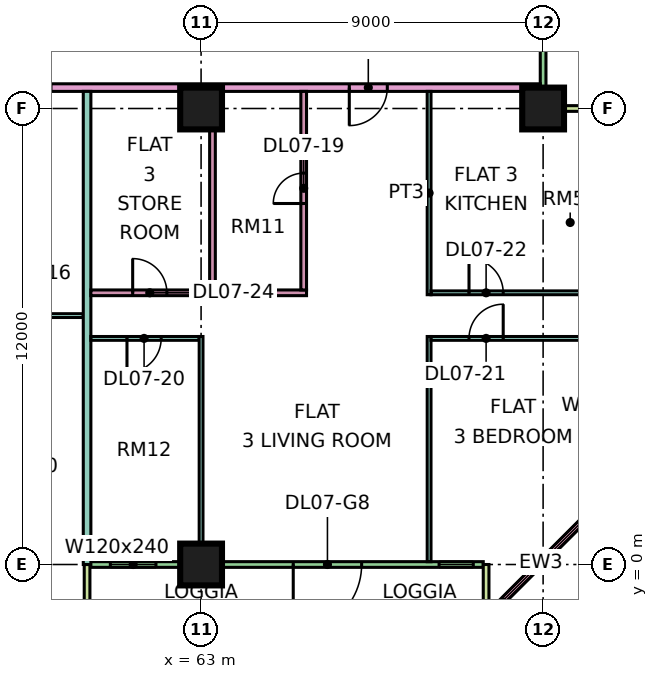
"""IFC4 building model, lengths in metres.
Left out: names, types, materials, properties, quantities, classifications, styles, units other than length and angle.
Written with IfcOpenShell. Run it as: python <this file> out.ifc"""

import sys

from ifc_helpers import new_model, si_unit, direction, frame, frame_2d, origin, origin_2d, place, context, subcontext, project, spatial, rectangle, extrude, element, fill, save


model = new_model("IFC4")
c1 = context("Model", 3, precision=1e-05, world=origin(), true_north=direction((0.0, 1.0)))
c2 = subcontext(c1, "Body", "Model", "MODEL_VIEW")
j1 = project(units=[si_unit("LENGTHUNIT", "METRE"), si_unit("PLANEANGLEUNIT", "RADIAN")], contexts=[c1])
p1 = place(None, origin())
s1 = spatial("IfcSite", under=j1, at=p1, CompositionType="ELEMENT")
p2 = place(p1, origin())
s2 = spatial("IfcBuilding", under=s1, at=p2, CompositionType="ELEMENT")
p3 = place(p2, frame((0.0, 0.0, 41.4)))
s3 = spatial("IfcBuildingStorey", under=s2, at=p3, CompositionType="ELEMENT", Elevation=41.4)
for number, where, z_axis, x_axis in (
    (1, (63.0, 0.0, 0.0), (0.0, 0.0, 1.0), (1.0, 0.0, 0.0)),
    (2, (63.0, 12.0, 0.0), (0.0, 0.0, 1.0), (1.0, 0.0, 0.0)),
    (3, (72.0, 12.0, 0.0), (0.0, 0.0, 1.0), (1.0, 0.0, 0.0)),
):
    element("IfcColumn", number, at=place(p3, frame(where, z_axis=z_axis, x_axis=x_axis)), inside=s3, PredefinedType="COLUMN", context=c2, shape_type="SweptSolid", body=[
        extrude(rectangle(XDim=1.1, YDim=1.1, at=origin_2d()), origin(), (0.0, 0.0, 1.0), 3.75),
    ])
p4 = place(p3, frame((60.075, 0.0, 0.0), z_axis=(0.0, 0.0, 1.0), x_axis=(1.0, 0.0, 0.0)))
e4 = element("IfcWall", 4, at=p4, inside=s3, PredefinedType="SOLIDWALL", context=c2, shape_type="SweptSolid", body=[
    extrude(rectangle(XDim=10.35, YDim=0.15, at=frame_2d((5.175, 0.0))), origin(), (0.0, 0.0, 1.0), 3.35),
])
p5 = place(p4, frame((0.538, 0.0, 0.45)))
e5 = element("IfcOpeningElement", 5, at=p5, cuts=e4, PredefinedType="OPENING", context=c2, shape_type="SweptSolid", body=[
    extrude(rectangle(XDim=1.2, YDim=2.4, at=frame_2d((0.6, 1.2))), frame((0.0, 0.085, 0.0), z_axis=(0.0, -1.0, 0.0), x_axis=(1.0, 0.0, 0.0)), (0.0, 0.0, 1.0), 0.17),
])
p6 = place(p4, frame((5.35, 0.0, 0.0)))
e6 = element("IfcOpeningElement", 6, at=p6, cuts=e4, PredefinedType="OPENING", context=c2, shape_type="SweptSolid", body=[
    extrude(rectangle(XDim=1.8, YDim=2.4, at=frame_2d((0.9, 1.2))), frame((0.0, 0.085, 0.0), z_axis=(0.0, -1.0, 0.0), x_axis=(1.0, 0.0, 0.0)), (0.0, 0.0, 1.0), 0.17),
])
p7 = place(p4, frame((9.188, 0.0, 0.45)))
e7 = element("IfcOpeningElement", 7, at=p7, cuts=e4, PredefinedType="OPENING", context=c2, shape_type="SweptSolid", body=[
    extrude(rectangle(XDim=0.9, YDim=2.4, at=frame_2d((0.45, 1.2))), frame((0.0, 0.085, 0.0), z_axis=(0.0, -1.0, 0.0), x_axis=(1.0, 0.0, 0.0)), (0.0, 0.0, 1.0), 0.17),
])
for number, where, z_axis, x_axis in (
    (8, (60.0, -1.5, 0.0), (0.0, 0.0, 1.0), (0.0, 1.0, 0.0)),
    (9, (70.5, -1.5, 0.0), (0.0, 0.0, 1.0), (0.0, 1.0, 0.0)),
):
    element("IfcWall", number, at=place(p3, frame(where, z_axis=z_axis, x_axis=x_axis)), inside=s3, PredefinedType="SOLIDWALL", context=c2, shape_type="SweptSolid", body=[
        extrude(rectangle(XDim=1.5, YDim=0.15, at=frame_2d((0.75, 0.0))), origin(), (0.0, 0.0, 1.0), 3.35),
    ])
p8 = place(p3, frame((70.447, -1.447, 0.0), z_axis=(0.0, 0.0, 1.0), x_axis=(0.707106781187, 0.707106781187, 0.0)))
e10 = element("IfcWall", 10, at=p8, inside=s3, PredefinedType="SOLIDWALL", context=c2, shape_type="SweptSolid", body=[
    extrude(rectangle(XDim=4.243, YDim=0.15, at=frame_2d((2.121, 0.0))), origin(), (0.0, 0.0, 1.0), 3.35),
])
p9 = place(p8, frame((0.744, 0.0, 0.45)))
e11 = element("IfcOpeningElement", 11, at=p9, cuts=e10, PredefinedType="OPENING", context=c2, shape_type="SweptSolid", body=[
    extrude(rectangle(XDim=3.0, YDim=2.4, at=frame_2d((1.5, 1.2))), frame((0.0, 0.085, 0.0), z_axis=(0.0, -1.0, 0.0), x_axis=(1.0, 0.0, 0.0)), (0.0, 0.0, 1.0), 0.17),
])
p10 = place(p3, frame((72.0, 12.075, 0.0), z_axis=(0.0, 0.0, 1.0), x_axis=(0.0, 1.0, 0.0)))
e12 = element("IfcWall", 12, at=p10, inside=s3, PredefinedType="SOLIDWALL", context=c2, shape_type="SweptSolid", body=[
    extrude(rectangle(XDim=10.35, YDim=0.15, at=frame_2d((5.175, 0.0))), origin(), (0.0, 0.0, 1.0), 3.35),
])
p11 = place(p10, frame((4.575, 0.0, 1.7)))
e13 = element("IfcOpeningElement", 13, at=p11, cuts=e12, PredefinedType="OPENING", context=c2, shape_type="SweptSolid", body=[
    extrude(rectangle(XDim=1.2, YDim=0.9, at=frame_2d((0.6, 0.45))), frame((0.0, 0.085, 0.0), z_axis=(0.0, -1.0, 0.0), x_axis=(1.0, 0.0, 0.0)), (0.0, 0.0, 1.0), 0.17),
])
p12 = place(p10, frame((8.587, 0.0, 0.45)))
e14 = element("IfcOpeningElement", 14, at=p12, cuts=e12, PredefinedType="OPENING", context=c2, shape_type="SweptSolid", body=[
    extrude(rectangle(XDim=1.2, YDim=2.4, at=frame_2d((0.6, 1.2))), frame((0.0, 0.085, 0.0), z_axis=(0.0, -1.0, 0.0), x_axis=(1.0, 0.0, 0.0)), (0.0, 0.0, 1.0), 0.17),
])
p13 = place(p3, frame((73.5, 12.0, 0.0), z_axis=(0.0, 0.0, 1.0), x_axis=(-1.0, 0.0, 0.0)))
e15 = element("IfcWall", 15, at=p13, inside=s3, PredefinedType="SOLIDWALL", context=c2, shape_type="SweptSolid", body=[
    extrude(rectangle(XDim=1.5, YDim=0.15, at=frame_2d((0.75, 0.0))), origin(), (0.0, 0.0, 1.0), 3.35),
])
p14 = place(p3, frame((40.65, 12.55, 0.0), z_axis=(0.0, 0.0, 1.0), x_axis=(1.0, 0.0, 0.0)))
e16 = element("IfcWall", 16, at=p14, inside=s3, PredefinedType="PARTITIONING", context=c2, shape_type="SweptSolid", body=[
    extrude(rectangle(XDim=31.276, YDim=0.2, at=frame_2d((15.638, 0.0))), origin(), (0.0, 0.0, 1.0), 3.35),
])
p15 = place(p14, frame((17.4, 0.0, 0.0)))
e17 = element("IfcOpeningElement", 17, at=p15, cuts=e16, PredefinedType="OPENING", context=c2, shape_type="SweptSolid", body=[
    extrude(rectangle(XDim=1.0, YDim=2.1, at=frame_2d((0.5, 1.05))), frame((0.0, 0.11, 0.0), z_axis=(0.0, -1.0, 0.0), x_axis=(1.0, 0.0, 0.0)), (0.0, 0.0, 1.0), 0.22),
])
p16 = place(p14, frame((26.25, 0.0, 0.0)))
e18 = element("IfcOpeningElement", 18, at=p16, cuts=e16, PredefinedType="OPENING", context=c2, shape_type="SweptSolid", body=[
    extrude(rectangle(XDim=1.0, YDim=2.1, at=frame_2d((0.5, 1.05))), frame((0.0, 0.11, 0.0), z_axis=(0.0, -1.0, 0.0), x_axis=(1.0, 0.0, 0.0)), (0.0, 0.0, 1.0), 0.22),
])
p17 = place(p14, frame((1.05, 0.0, 0.0)))
e19 = element("IfcOpeningElement", 19, at=p17, cuts=e16, PredefinedType="OPENING", context=c2, shape_type="SweptSolid", body=[
    extrude(rectangle(XDim=1.0, YDim=2.1, at=frame_2d((0.5, 1.05))), frame((0.0, 0.11, 0.0), z_axis=(0.0, -1.0, 0.0), x_axis=(1.0, 0.0, 0.0)), (0.0, 0.0, 1.0), 0.22),
])
p18 = place(p3, frame((54.05, 6.55, 0.0), z_axis=(0.0, 0.0, 1.0), x_axis=(1.0, 0.0, 0.0)))
e20 = element("IfcWall", 20, at=p18, inside=s3, PredefinedType="PARTITIONING", context=c2, shape_type="SweptSolid", body=[
    extrude(rectangle(XDim=5.85, YDim=0.1, at=frame_2d((2.925, 0.0))), origin(), (0.0, 0.0, 1.0), 3.35),
])
p19 = place(p18, frame((1.0, 0.0, 0.0)))
e21 = element("IfcOpeningElement", 21, at=p19, cuts=e20, PredefinedType="OPENING", context=c2, shape_type="SweptSolid", body=[
    extrude(rectangle(XDim=0.9, YDim=2.1, at=frame_2d((0.45, 1.05))), frame((0.0, 0.06, 0.0), z_axis=(0.0, -1.0, 0.0), x_axis=(1.0, 0.0, 0.0)), (0.0, 0.0, 1.0), 0.12),
])
p20 = place(p18, frame((4.0, 0.0, 0.0)))
e22 = element("IfcOpeningElement", 22, at=p20, cuts=e20, PredefinedType="OPENING", context=c2, shape_type="SweptSolid", body=[
    extrude(rectangle(XDim=0.9, YDim=2.1, at=frame_2d((0.45, 1.05))), frame((0.0, 0.06, 0.0), z_axis=(0.0, -1.0, 0.0), x_axis=(1.0, 0.0, 0.0)), (0.0, 0.0, 1.0), 0.12),
])
p21 = place(p3, frame((60.0, 0.0, 0.0), z_axis=(0.0, 0.0, 1.0), x_axis=(0.0, 1.0, 0.0)))
e23 = element("IfcWall", 23, at=p21, inside=s3, PredefinedType="PARTITIONING", context=c2, shape_type="SweptSolid", body=[
    extrude(rectangle(XDim=12.45, YDim=0.2, at=frame_2d((6.225, 0.0))), origin(), (0.0, 0.0, 1.0), 3.35),
])
p22 = place(p3, frame((60.1, 5.95, 0.0), z_axis=(0.0, 0.0, 1.0), x_axis=(1.0, 0.0, 0.0)))
e24 = element("IfcWall", 24, at=p22, inside=s3, PredefinedType="PARTITIONING", context=c2, shape_type="SweptSolid", body=[
    extrude(rectangle(XDim=2.85, YDim=0.1, at=frame_2d((1.425, 0.0))), origin(), (0.0, 0.0, 1.0), 3.35),
])
p23 = place(p22, frame((0.95, 0.0, 0.0)))
e25 = element("IfcOpeningElement", 25, at=p23, cuts=e24, PredefinedType="OPENING", context=c2, shape_type="SweptSolid", body=[
    extrude(rectangle(XDim=0.9, YDim=2.1, at=frame_2d((0.45, 1.05))), frame((0.0, 0.06, 0.0), z_axis=(0.0, -1.0, 0.0), x_axis=(1.0, 0.0, 0.0)), (0.0, 0.0, 1.0), 0.12),
])
p24 = place(p3, frame((60.1, 7.15, 0.0), z_axis=(0.0, 0.0, 1.0), x_axis=(1.0, 0.0, 0.0)))
e26 = element("IfcWall", 26, at=p24, inside=s3, PredefinedType="PARTITIONING", context=c2, shape_type="SweptSolid", body=[
    extrude(rectangle(XDim=5.675, YDim=0.15, at=frame_2d((2.837, 0.0))), origin(), (0.0, 0.0, 1.0), 3.35),
])
p25 = place(p24, frame((1.1, 0.0, 0.0)))
e27 = element("IfcOpeningElement", 27, at=p25, cuts=e26, PredefinedType="OPENING", context=c2, shape_type="SweptSolid", body=[
    extrude(rectangle(XDim=0.9, YDim=2.1, at=frame_2d((0.45, 1.05))), frame((0.0, 0.085, 0.0), z_axis=(0.0, -1.0, 0.0), x_axis=(1.0, 0.0, 0.0)), (0.0, 0.0, 1.0), 0.17),
])
p26 = place(p3, frame((63.0, 0.074, 0.0), z_axis=(0.0, 0.0, 1.0), x_axis=(0.0, 1.0, 0.0)))
e28 = element("IfcWall", 28, at=p26, inside=s3, PredefinedType="PARTITIONING", context=c2, shape_type="SweptSolid", body=[
    extrude(rectangle(XDim=5.926, YDim=0.1, at=frame_2d((2.963, 0.0))), origin(), (0.0, 0.0, 1.0), 3.35),
])
p27 = place(p3, frame((63.3, 7.225, 0.0), z_axis=(0.0, 0.0, 1.0), x_axis=(0.0, 1.0, 0.0)))
e29 = element("IfcWall", 29, at=p27, inside=s3, PredefinedType="PARTITIONING", context=c2, shape_type="SweptSolid", body=[
    extrude(rectangle(XDim=5.225, YDim=0.15, at=frame_2d((2.612, 0.0))), origin(), (0.0, 0.0, 1.0), 3.35),
])
p28 = place(p3, frame((65.7, 7.225, 0.0), z_axis=(0.0, 0.0, 1.0), x_axis=(0.0, 1.0, 0.0)))
e30 = element("IfcWall", 30, at=p28, inside=s3, PredefinedType="PARTITIONING", context=c2, shape_type="SweptSolid", body=[
    extrude(rectangle(XDim=5.225, YDim=0.15, at=frame_2d((2.612, 0.0))), origin(), (0.0, 0.0, 1.0), 3.35),
])
p29 = place(p28, frame((2.275, 0.0, 0.0)))
e31 = element("IfcOpeningElement", 31, at=p29, cuts=e30, PredefinedType="OPENING", context=c2, shape_type="SweptSolid", body=[
    extrude(rectangle(XDim=0.8, YDim=2.1, at=frame_2d((0.4, 1.05))), frame((0.0, 0.085, 0.0), z_axis=(0.0, -1.0, 0.0), x_axis=(1.0, 0.0, 0.0)), (0.0, 0.0, 1.0), 0.17),
])
p30 = place(p3, frame((69.0, 0.074, 0.0), z_axis=(0.0, 0.0, 1.0), x_axis=(0.0, 1.0, 0.0)))
e32 = element("IfcWall", 32, at=p30, inside=s3, PredefinedType="PARTITIONING", context=c2, shape_type="SweptSolid", body=[
    extrude(rectangle(XDim=5.926, YDim=0.1, at=frame_2d((2.963, 0.0))), origin(), (0.0, 0.0, 1.0), 3.35),
])
p31 = place(p3, frame((69.0, 7.1, 0.0), z_axis=(0.0, 0.0, 1.0), x_axis=(0.0, 1.0, 0.0)))
e33 = element("IfcWall", 33, at=p31, inside=s3, PredefinedType="PARTITIONING", context=c2, shape_type="SweptSolid", body=[
    extrude(rectangle(XDim=5.35, YDim=0.1, at=frame_2d((2.675, 0.0))), origin(), (0.0, 0.0, 1.0), 3.35),
])
p32 = place(p3, frame((69.05, 5.95, 0.0), z_axis=(0.0, 0.0, 1.0), x_axis=(1.0, 0.0, 0.0)))
e34 = element("IfcWall", 34, at=p32, inside=s3, PredefinedType="PARTITIONING", context=c2, shape_type="SweptSolid", body=[
    extrude(rectangle(XDim=4.3, YDim=0.1, at=frame_2d((2.15, 0.0))), origin(), (0.0, 0.0, 1.0), 3.35),
])
p33 = place(p32, frame((1.0, 0.0, 0.0)))
e35 = element("IfcOpeningElement", 35, at=p33, cuts=e34, PredefinedType="OPENING", context=c2, shape_type="SweptSolid", body=[
    extrude(rectangle(XDim=0.9, YDim=2.1, at=frame_2d((0.45, 1.05))), frame((0.0, 0.06, 0.0), z_axis=(0.0, -1.0, 0.0), x_axis=(1.0, 0.0, 0.0)), (0.0, 0.0, 1.0), 0.12),
])
p34 = place(p3, frame((69.05, 7.15, 0.0), z_axis=(0.0, 0.0, 1.0), x_axis=(1.0, 0.0, 0.0)))
e36 = element("IfcWall", 36, at=p34, inside=s3, PredefinedType="PARTITIONING", context=c2, shape_type="SweptSolid", body=[
    extrude(rectangle(XDim=4.3, YDim=0.1, at=frame_2d((2.15, 0.0))), origin(), (0.0, 0.0, 1.0), 3.35),
])
p35 = place(p34, frame((1.0, 0.0, 0.0)))
e37 = element("IfcOpeningElement", 37, at=p35, cuts=e36, PredefinedType="OPENING", context=c2, shape_type="SweptSolid", body=[
    extrude(rectangle(XDim=0.9, YDim=2.1, at=frame_2d((0.45, 1.05))), frame((0.0, 0.06, 0.0), z_axis=(0.0, -1.0, 0.0), x_axis=(1.0, 0.0, 0.0)), (0.0, 0.0, 1.0), 0.12),
])
p36 = place(p5, origin())
e38 = element("IfcWindow", 38, at=p36, inside=s3, PartitioningType="SINGLE_PANEL", PredefinedType="WINDOW", context=c2, shape_type="SweptSolid", body=[
    extrude(rectangle(XDim=1.2, YDim=2.4, at=frame_2d((0.6, 1.2))), frame((0.0, 0.03, 0.0), z_axis=(0.0, -1.0, 0.0), x_axis=(1.0, 0.0, 0.0)), (0.0, 0.0, 1.0), 0.06),
])
fill(e5, e38)
p37 = place(p6, frame((1.8, 0.0, 0.0), z_axis=(0.0, 0.0, 1.0), x_axis=(-1.0, 0.0, 0.0)))
e39 = element("IfcDoor", 39, at=p37, inside=s3, OperationType="DOUBLE_DOOR_SINGLE_SWING", PredefinedType="DOOR", context=c2, shape_type="SweptSolid", body=[
    extrude(rectangle(XDim=1.8, YDim=2.4, at=frame_2d((0.9, 1.2))), frame((0.0, 0.025, 0.0), z_axis=(0.0, -1.0, 0.0), x_axis=(1.0, 0.0, 0.0)), (0.0, 0.0, 1.0), 0.05),
])
fill(e6, e39)
p38 = place(p7, origin())
e40 = element("IfcWindow", 40, at=p38, inside=s3, PartitioningType="SINGLE_PANEL", PredefinedType="WINDOW", context=c2, shape_type="SweptSolid", body=[
    extrude(rectangle(XDim=0.9, YDim=2.4, at=frame_2d((0.45, 1.2))), frame((0.0, 0.03, 0.0), z_axis=(0.0, -1.0, 0.0), x_axis=(1.0, 0.0, 0.0)), (0.0, 0.0, 1.0), 0.06),
])
fill(e7, e40)
p39 = place(p9, origin())
e41 = element("IfcWindow", 41, at=p39, inside=s3, PartitioningType="SINGLE_PANEL", PredefinedType="WINDOW", context=c2, shape_type="SweptSolid", body=[
    extrude(rectangle(XDim=3.0, YDim=2.4, at=frame_2d((1.5, 1.2))), frame((0.0, 0.03, 0.0), z_axis=(0.0, -1.0, 0.0), x_axis=(1.0, 0.0, 0.0)), (0.0, 0.0, 1.0), 0.06),
])
fill(e11, e41)
p40 = place(p29, origin())
e42 = element("IfcDoor", 42, at=p40, inside=s3, OperationType="SINGLE_SWING_LEFT", PredefinedType="DOOR", context=c2, shape_type="SweptSolid", body=[
    extrude(rectangle(XDim=0.8, YDim=2.1, at=frame_2d((0.4, 1.05))), frame((0.0, 0.025, 0.0), z_axis=(0.0, -1.0, 0.0), x_axis=(1.0, 0.0, 0.0)), (0.0, 0.0, 1.0), 0.05),
])
fill(e31, e42)
p41 = place(p23, frame((0.9, 0.0, 0.0), z_axis=(0.0, 0.0, 1.0), x_axis=(-1.0, 0.0, 0.0)))
e43 = element("IfcDoor", 43, at=p41, inside=s3, OperationType="SINGLE_SWING_LEFT", PredefinedType="DOOR", context=c2, shape_type="SweptSolid", body=[
    extrude(rectangle(XDim=0.9, YDim=2.1, at=frame_2d((0.45, 1.05))), frame((0.0, 0.025, 0.0), z_axis=(0.0, -1.0, 0.0), x_axis=(1.0, 0.0, 0.0)), (0.0, 0.0, 1.0), 0.05),
])
fill(e25, e43)
p42 = place(p33, frame((0.9, 0.0, 0.0), z_axis=(0.0, 0.0, 1.0), x_axis=(-1.0, 0.0, 0.0)))
e44 = element("IfcDoor", 44, at=p42, inside=s3, OperationType="SINGLE_SWING_RIGHT", PredefinedType="DOOR", context=c2, shape_type="SweptSolid", body=[
    extrude(rectangle(XDim=0.9, YDim=2.1, at=frame_2d((0.45, 1.05))), frame((0.0, 0.025, 0.0), z_axis=(0.0, -1.0, 0.0), x_axis=(1.0, 0.0, 0.0)), (0.0, 0.0, 1.0), 0.05),
])
fill(e35, e44)
p43 = place(p35, origin())
e45 = element("IfcDoor", 45, at=p43, inside=s3, OperationType="SINGLE_SWING_LEFT", PredefinedType="DOOR", context=c2, shape_type="SweptSolid", body=[
    extrude(rectangle(XDim=0.9, YDim=2.1, at=frame_2d((0.45, 1.05))), frame((0.0, 0.025, 0.0), z_axis=(0.0, -1.0, 0.0), x_axis=(1.0, 0.0, 0.0)), (0.0, 0.0, 1.0), 0.05),
])
fill(e37, e45)
p44 = place(p16, frame((1.0, 0.0, 0.0), z_axis=(0.0, 0.0, 1.0), x_axis=(-1.0, 0.0, 0.0)))
e46 = element("IfcDoor", 46, at=p44, inside=s3, OperationType="SINGLE_SWING_LEFT", PredefinedType="DOOR", context=c2, shape_type="SweptSolid", body=[
    extrude(rectangle(XDim=1.0, YDim=2.1, at=frame_2d((0.5, 1.05))), frame((0.0, 0.025, 0.0), z_axis=(0.0, -1.0, 0.0), x_axis=(1.0, 0.0, 0.0)), (0.0, 0.0, 1.0), 0.05),
])
fill(e18, e46)
p45 = place(p25, origin())
e47 = element("IfcDoor", 47, at=p45, inside=s3, OperationType="SINGLE_SWING_LEFT", PredefinedType="DOOR", context=c2, shape_type="SweptSolid", body=[
    extrude(rectangle(XDim=0.9, YDim=2.1, at=frame_2d((0.45, 1.05))), frame((0.0, 0.025, 0.0), z_axis=(0.0, -1.0, 0.0), x_axis=(1.0, 0.0, 0.0)), (0.0, 0.0, 1.0), 0.05),
])
fill(e27, e47)
save(model, sys.argv[1])
